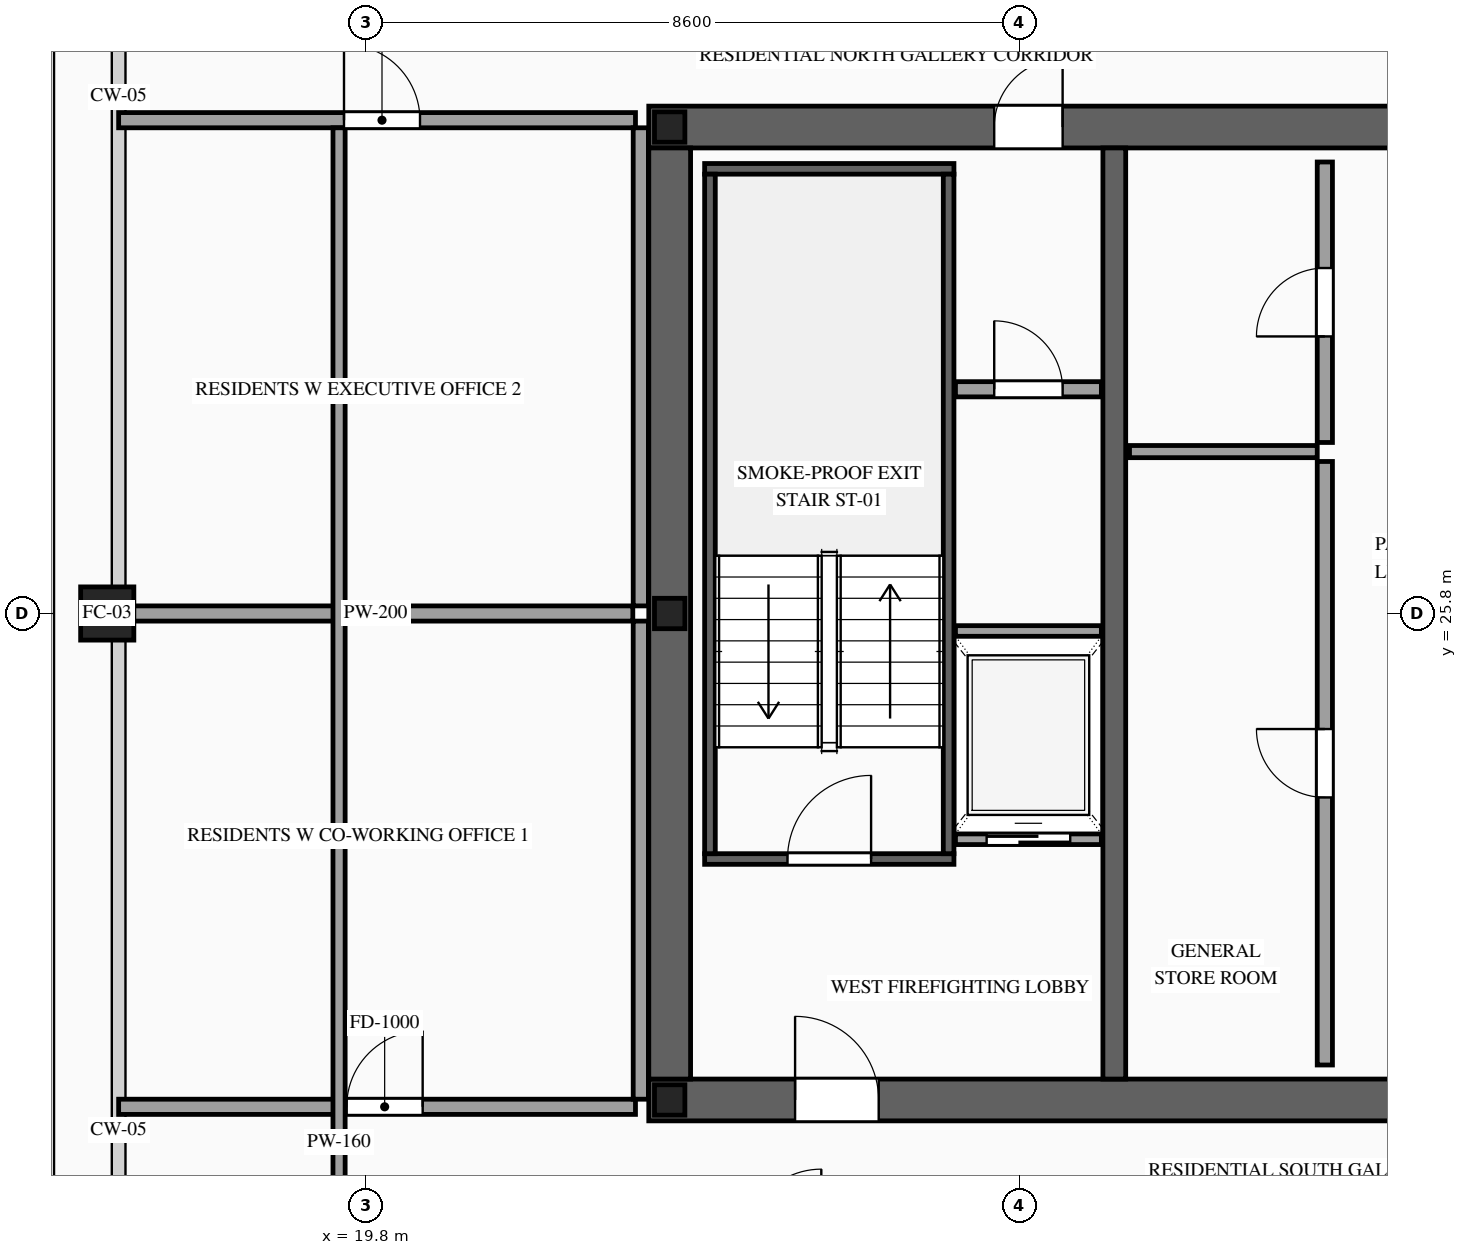
"""IFC4 building model, lengths in metres.
Left out: names, types, materials, properties, quantities, classifications, styles, units other than length and angle.
Written with IfcOpenShell. Run it as: python <this file> out.ifc"""

import sys

from ifc_helpers import new_model, si_unit, direction, frame, frame_2d, origin, origin_2d, place, context, subcontext, project, spatial, rectangle, hollow_rectangle, i_section, extrude, source, transform, mapped, element, fill, save


model = new_model("IFC4")
c1 = context("Model", 3, precision=1e-05, world=origin(), true_north=direction((0.0, 1.0)))
c2 = subcontext(c1, "Body", "Model", "MODEL_VIEW")
j1 = project(units=[si_unit("LENGTHUNIT", "METRE"), si_unit("PLANEANGLEUNIT", "RADIAN")], contexts=[c1])
p1 = place(None, origin())
s1 = spatial("IfcSite", under=j1, at=p1, CompositionType="ELEMENT")
p2 = place(p1, origin())
s2 = spatial("IfcBuilding", under=s1, at=p2, CompositionType="ELEMENT")
p3 = place(p2, frame((0.0, 0.0, 238.1)))
s3 = spatial("IfcBuildingStorey", under=s2, at=p3, CompositionType="ELEMENT", Elevation=238.1)
p4 = place(p3, frame((23.525, 19.4, 0.0), z_axis=(0.0, 0.0, 1.0), x_axis=(1.0, 0.0, 0.0)))
e1 = element("IfcWall", 1, at=p4, inside=s3, PredefinedType="SHEAR", context=c2, shape_type="SweptSolid", body=[
    extrude(rectangle(XDim=26.95, YDim=0.55, at=frame_2d((13.475, 0.0))), origin(), (0.0, 0.0, 1.0), 3.5),
])
p5 = place(p4, frame((1.925, 0.0, 0.0)))
e2 = element("IfcOpeningElement", 2, at=p5, cuts=e1, PredefinedType="OPENING", context=c2, shape_type="SweptSolid", body=[
    extrude(rectangle(XDim=1.1, YDim=2.2, at=frame_2d((0.55, 1.1))), frame((0.0, 0.29, 0.0), z_axis=(0.0, -1.0, 0.0), x_axis=(1.0, 0.0, 0.0)), (0.0, 0.0, 1.0), 0.58),
])
p6 = place(p4, frame((9.825, 0.0, 0.0)))
e3 = element("IfcOpeningElement", 3, at=p6, cuts=e1, PredefinedType="OPENING", context=c2, shape_type="SweptSolid", body=[
    extrude(rectangle(XDim=1.1, YDim=2.2, at=frame_2d((0.55, 1.1))), frame((0.0, 0.29, 0.0), z_axis=(0.0, -1.0, 0.0), x_axis=(1.0, 0.0, 0.0)), (0.0, 0.0, 1.0), 0.58),
])
p7 = place(p4, frame((23.025, 0.0, 0.0)))
e4 = element("IfcOpeningElement", 4, at=p7, cuts=e1, PredefinedType="OPENING", context=c2, shape_type="SweptSolid", body=[
    extrude(rectangle(XDim=1.1, YDim=2.2, at=frame_2d((0.55, 1.1))), frame((0.0, 0.29, 0.0), z_axis=(0.0, -1.0, 0.0), x_axis=(1.0, 0.0, 0.0)), (0.0, 0.0, 1.0), 0.58),
])
p8 = place(p4, frame((19.645, 0.0, 0.0)))
e5 = element("IfcOpeningElement", 5, at=p8, cuts=e1, PredefinedType="OPENING", context=c2, shape_type="SweptSolid", body=[
    extrude(rectangle(XDim=0.9, YDim=2.15, at=frame_2d((0.45, 1.075))), frame((0.0, 0.29, 0.0), z_axis=(0.0, -1.0, 0.0), x_axis=(1.0, 0.0, 0.0)), (0.0, 0.0, 1.0), 0.58),
])
p9 = place(p4, frame((18.205, 0.0, 0.0)))
e6 = element("IfcOpeningElement", 6, at=p9, cuts=e1, PredefinedType="OPENING", context=c2, shape_type="SweptSolid", body=[
    extrude(rectangle(XDim=0.9, YDim=2.15, at=frame_2d((0.45, 1.075))), frame((0.0, 0.29, 0.0), z_axis=(0.0, -1.0, 0.0), x_axis=(1.0, 0.0, 0.0)), (0.0, 0.0, 1.0), 0.58),
])
p10 = place(p3, frame((23.525, 32.2, 0.0), z_axis=(0.0, 0.0, 1.0), x_axis=(1.0, 0.0, 0.0)))
e7 = element("IfcWall", 7, at=p10, inside=s3, PredefinedType="SHEAR", context=c2, shape_type="SweptSolid", body=[
    extrude(rectangle(XDim=26.95, YDim=0.55, at=frame_2d((13.475, 0.0))), origin(), (0.0, 0.0, 1.0), 3.5),
])
p11 = place(p10, frame((4.545, 0.0, 0.0)))
e8 = element("IfcOpeningElement", 8, at=p11, cuts=e7, PredefinedType="OPENING", context=c2, shape_type="SweptSolid", body=[
    extrude(rectangle(XDim=0.9, YDim=2.15, at=frame_2d((0.45, 1.075))), frame((0.0, 0.29, 0.0), z_axis=(0.0, -1.0, 0.0), x_axis=(1.0, 0.0, 0.0)), (0.0, 0.0, 1.0), 0.58),
])
p12 = place(p10, frame((9.825, 0.0, 0.0)))
e9 = element("IfcOpeningElement", 9, at=p12, cuts=e7, PredefinedType="OPENING", context=c2, shape_type="SweptSolid", body=[
    extrude(rectangle(XDim=1.1, YDim=2.2, at=frame_2d((0.55, 1.1))), frame((0.0, 0.29, 0.0), z_axis=(0.0, -1.0, 0.0), x_axis=(1.0, 0.0, 0.0)), (0.0, 0.0, 1.0), 0.58),
])
p13 = place(p10, frame((15.675, 0.0, 0.0)))
e10 = element("IfcOpeningElement", 10, at=p13, cuts=e7, PredefinedType="OPENING", context=c2, shape_type="SweptSolid", body=[
    extrude(rectangle(XDim=1.1, YDim=2.2, at=frame_2d((0.55, 1.1))), frame((0.0, 0.29, 0.0), z_axis=(0.0, -1.0, 0.0), x_axis=(1.0, 0.0, 0.0)), (0.0, 0.0, 1.0), 0.58),
])
p14 = place(p10, frame((18.205, 0.0, 0.0)))
e11 = element("IfcOpeningElement", 11, at=p14, cuts=e7, PredefinedType="OPENING", context=c2, shape_type="SweptSolid", body=[
    extrude(rectangle(XDim=0.9, YDim=2.15, at=frame_2d((0.45, 1.075))), frame((0.0, 0.29, 0.0), z_axis=(0.0, -1.0, 0.0), x_axis=(1.0, 0.0, 0.0)), (0.0, 0.0, 1.0), 0.58),
])
p15 = place(p10, frame((19.645, 0.0, 0.0)))
e12 = element("IfcOpeningElement", 12, at=p15, cuts=e7, PredefinedType="OPENING", context=c2, shape_type="SweptSolid", body=[
    extrude(rectangle(XDim=0.9, YDim=2.15, at=frame_2d((0.45, 1.075))), frame((0.0, 0.29, 0.0), z_axis=(0.0, -1.0, 0.0), x_axis=(1.0, 0.0, 0.0)), (0.0, 0.0, 1.0), 0.58),
])
m1 = source(origin(), c2, "Body", "SweptSolid", [
    extrude(rectangle(XDim=12.25, YDim=0.55, at=frame_2d((6.125, 0.0))), origin(), (0.0, 0.0, 1.0), 3.5),
])
p16 = place(p3, frame((23.8, 19.675, 0.0), z_axis=(0.0, 0.0, 1.0), x_axis=(0.0, 1.0, 0.0)))
e13 = element("IfcWall", 13, at=p16, inside=s3, PredefinedType="SHEAR", context=c2, shape_type="MappedRepresentation", body=[
    mapped(m1, transform((0.0, 0.0, 0.0), scale=1.0)),
])
m2 = source(origin(), c2, "Body", "SweptSolid", [
    extrude(rectangle(XDim=12.25, YDim=0.3, at=frame_2d((6.125, 0.0))), origin(), (0.0, 0.0, 1.0), 3.5),
])
p17 = place(p3, frame((29.65, 19.675, 0.0), z_axis=(0.0, 0.0, 1.0), x_axis=(0.0, 1.0, 0.0)))
e14 = element("IfcWall", 14, at=p17, inside=s3, PredefinedType="SOLIDWALL", context=c2, shape_type="MappedRepresentation", body=[
    mapped(m2, transform((0.0, 0.0, 0.0), scale=1.0)),
])
m3 = source(origin(), c2, "Body", "SweptSolid", [
    extrude(i_section(OverallWidth=0.4, OverallDepth=0.4, WebThickness=0.013, FlangeThickness=0.021, at=origin_2d()), origin(), (0.0, 0.0, 1.0), 3.5),
])
for number, where, z_axis, x_axis in (
    (15, (23.8, 19.4, 0.0), (0.0, 0.0, 1.0), (1.0, 0.0, 0.0)),
    (16, (23.8, 25.8, 0.0), (0.0, 0.0, 1.0), (1.0, 0.0, 0.0)),
    (17, (23.8, 32.2, 0.0), (0.0, 0.0, 1.0), (1.0, 0.0, 0.0)),
):
    element("IfcColumn", number, at=place(p3, frame(where, z_axis=z_axis, x_axis=x_axis)), inside=s3, PredefinedType="COLUMN", context=c2, shape_type="MappedRepresentation", body=[
        mapped(m3, transform((0.0, 0.0, 0.0), scale=1.0)),
    ])
m4 = source(origin(), c2, "Body", "SweptSolid", [
    extrude(hollow_rectangle(XDim=0.7, YDim=0.7, WallThickness=0.032, at=origin_2d()), origin(), (0.0, 0.0, 1.0), 3.5),
])
p18 = place(p3, frame((16.4, 25.8, 0.0), z_axis=(0.0, 0.0, 1.0), x_axis=(1.0, 0.0, 0.0)))
e18 = element("IfcColumn", 18, at=p18, inside=s3, PredefinedType="COLUMN", context=c2, shape_type="MappedRepresentation", body=[
    mapped(m4, transform((0.0, 0.0, 0.0), scale=1.0)),
])
p19 = place(p3, frame((27.56, 22.83, 0.0), z_axis=(0.0, 0.0, 1.0), x_axis=(1.0, 0.0, 0.0)))
e19 = element("IfcWall", 19, at=p19, inside=s3, PredefinedType="SOLIDWALL", context=c2, shape_type="SweptSolid", body=[
    extrude(rectangle(XDim=1.92, YDim=0.14, at=frame_2d((0.96, 0.0))), origin(), (0.0, 0.0, 1.0), 3.28),
])
p20 = place(p19, frame((0.41, 0.0, 0.0)))
e20 = element("IfcOpeningElement", 20, at=p20, cuts=e19, PredefinedType="OPENING", context=c2, shape_type="SweptSolid", body=[
    extrude(rectangle(XDim=1.1, YDim=2.2, at=frame_2d((0.55, 1.1))), frame((0.0, 0.085, 0.0), z_axis=(0.0, -1.0, 0.0), x_axis=(1.0, 0.0, 0.0)), (0.0, 0.0, 1.0), 0.17),
])
m5 = source(origin(), c2, "Body", "SweptSolid", [
    extrude(rectangle(XDim=1.92, YDim=0.14, at=frame_2d((0.96, 0.0))), origin(), (0.0, 0.0, 1.0), 3.28),
])
p21 = place(p3, frame((27.56, 25.57, 0.0), z_axis=(0.0, 0.0, 1.0), x_axis=(1.0, 0.0, 0.0)))
e21 = element("IfcWall", 21, at=p21, inside=s3, PredefinedType="SOLIDWALL", context=c2, shape_type="MappedRepresentation", body=[
    mapped(m5, transform((0.0, 0.0, 0.0), scale=1.0)),
])
p22 = place(p3, frame((24.26, 22.57, 0.0), z_axis=(0.0, 0.0, 1.0), x_axis=(1.0, 0.0, 0.0)))
e22 = element("IfcWall", 22, at=p22, inside=s3, PredefinedType="SOLIDWALL", context=c2, shape_type="SweptSolid", body=[
    extrude(rectangle(XDim=3.28, YDim=0.14, at=frame_2d((1.64, 0.0))), origin(), (0.0, 0.0, 1.0), 3.28),
])
p23 = place(p22, frame((1.09, 0.0, 0.0)))
e23 = element("IfcOpeningElement", 23, at=p23, cuts=e22, PredefinedType="OPENING", context=c2, shape_type="SweptSolid", body=[
    extrude(rectangle(XDim=1.1, YDim=2.2, at=frame_2d((0.55, 1.1))), frame((0.0, 0.085, 0.0), z_axis=(0.0, -1.0, 0.0), x_axis=(1.0, 0.0, 0.0)), (0.0, 0.0, 1.0), 0.17),
])
m6 = source(origin(), c2, "Body", "SweptSolid", [
    extrude(rectangle(XDim=3.28, YDim=0.14, at=frame_2d((1.64, 0.0))), origin(), (0.0, 0.0, 1.0), 3.28),
])
p24 = place(p3, frame((24.26, 31.65, 0.0), z_axis=(0.0, 0.0, 1.0), x_axis=(1.0, 0.0, 0.0)))
e24 = element("IfcWall", 24, at=p24, inside=s3, PredefinedType="SOLIDWALL", context=c2, shape_type="MappedRepresentation", body=[
    mapped(m6, transform((0.0, 0.0, 0.0), scale=1.0)),
])
m7 = source(origin(), c2, "Body", "SweptSolid", [
    extrude(rectangle(XDim=8.94, YDim=0.14, at=frame_2d((4.47, 0.0))), origin(), (0.0, 0.0, 1.0), 3.28),
])
for number, where, z_axis, x_axis in (
    (25, (24.33, 22.64, 0.0), (0.0, 0.0, 1.0), (0.0, 1.0, 0.0)),
    (26, (27.47, 22.64, 0.0), (0.0, 0.0, 1.0), (0.0, 1.0, 0.0)),
):
    element("IfcWall", number, at=place(p3, frame(where, z_axis=z_axis, x_axis=x_axis)), inside=s3, PredefinedType="SOLIDWALL", context=c2, shape_type="MappedRepresentation", body=[
        mapped(m7, transform((0.0, 0.0, 0.0), scale=1.0)),
    ])
p25 = place(p3, frame((27.56, 28.75, 0.0), z_axis=(0.0, 0.0, 1.0), x_axis=(1.0, 0.0, 0.0)))
e27 = element("IfcWall", 27, at=p25, inside=s3, PredefinedType="PARTITIONING", context=c2, shape_type="SweptSolid", body=[
    extrude(rectangle(XDim=1.92, YDim=0.2, at=frame_2d((0.96, 0.0))), origin(), (0.0, 0.0, 1.0), 3.28),
])
p26 = place(p25, frame((0.51, 0.0, 0.0)))
e28 = element("IfcOpeningElement", 28, at=p26, cuts=e27, PredefinedType="OPENING", context=c2, shape_type="SweptSolid", body=[
    extrude(rectangle(XDim=0.9, YDim=2.15, at=frame_2d((0.45, 1.075))), frame((0.0, 0.115, 0.0), z_axis=(0.0, -1.0, 0.0), x_axis=(1.0, 0.0, 0.0)), (0.0, 0.0, 1.0), 0.23),
])
p27 = place(p3, frame((32.42, 19.86, 0.0), z_axis=(0.0, 0.0, 1.0), x_axis=(0.0, 1.0, 0.0)))
e29 = element("IfcWall", 29, at=p27, inside=s3, PredefinedType="PARTITIONING", context=c2, shape_type="SweptSolid", body=[
    extrude(rectangle(XDim=7.94, YDim=0.2, at=frame_2d((3.97, 0.0))), origin(), (0.0, 0.0, 1.0), 3.28),
])
p28 = place(p27, frame((3.52, 0.0, 0.0)))
e30 = element("IfcOpeningElement", 30, at=p28, cuts=e29, PredefinedType="OPENING", context=c2, shape_type="SweptSolid", body=[
    extrude(rectangle(XDim=0.9, YDim=2.15, at=frame_2d((0.45, 1.075))), frame((0.0, 0.115, 0.0), z_axis=(0.0, -1.0, 0.0), x_axis=(1.0, 0.0, 0.0)), (0.0, 0.0, 1.0), 0.23),
])
p29 = place(p3, frame((32.42, 28.05, 0.0), z_axis=(0.0, 0.0, 1.0), x_axis=(0.0, 1.0, 0.0)))
e31 = element("IfcWall", 31, at=p29, inside=s3, PredefinedType="PARTITIONING", context=c2, shape_type="SweptSolid", body=[
    extrude(rectangle(XDim=3.69, YDim=0.2, at=frame_2d((1.845, 0.0))), origin(), (0.0, 0.0, 1.0), 3.28),
])
p30 = place(p29, frame((1.395, 0.0, 0.0)))
e32 = element("IfcOpeningElement", 32, at=p30, cuts=e31, PredefinedType="OPENING", context=c2, shape_type="SweptSolid", body=[
    extrude(rectangle(XDim=0.9, YDim=2.15, at=frame_2d((0.45, 1.075))), frame((0.0, 0.115, 0.0), z_axis=(0.0, -1.0, 0.0), x_axis=(1.0, 0.0, 0.0)), (0.0, 0.0, 1.0), 0.23),
])
m8 = source(origin(), c2, "Body", "SweptSolid", [
    extrude(rectangle(XDim=2.47, YDim=0.16, at=frame_2d((1.235, 0.0))), origin(), (0.0, 0.0, 1.0), 3.28),
])
p31 = place(p3, frame((29.85, 27.93, 0.0), z_axis=(0.0, 0.0, 1.0), x_axis=(1.0, 0.0, 0.0)))
e33 = element("IfcWall", 33, at=p31, inside=s3, PredefinedType="PARTITIONING", context=c2, shape_type="MappedRepresentation", body=[
    mapped(m8, transform((0.0, 0.0, 0.0), scale=1.0)),
])
p32 = place(p3, frame((16.55, 19.31, 0.0), z_axis=(0.0, 0.0, 1.0), x_axis=(1.0, 0.0, 0.0)))
e34 = element("IfcWall", 34, at=p32, inside=s3, PredefinedType="PARTITIONING", context=c2, shape_type="SweptSolid", body=[
    extrude(rectangle(XDim=6.8, YDim=0.2, at=frame_2d((3.4, 0.0))), origin(), (0.0, 0.0, 1.0), 2.825),
])
p33 = place(p32, frame((3.0, 0.0, 0.0)))
e35 = element("IfcOpeningElement", 35, at=p33, cuts=e34, PredefinedType="OPENING", context=c2, shape_type="SweptSolid", body=[
    extrude(rectangle(XDim=1.0, YDim=2.2, at=frame_2d((0.5, 1.1))), frame((0.0, 0.115, 0.0), z_axis=(0.0, -1.0, 0.0), x_axis=(1.0, 0.0, 0.0)), (0.0, 0.0, 1.0), 0.23),
])
m9 = source(origin(), c2, "Body", "SweptSolid", [
    extrude(rectangle(XDim=6.765, YDim=0.2, at=frame_2d((3.382, 0.0))), origin(), (0.0, 0.0, 1.0), 2.787),
])
p34 = place(p3, frame((16.55, 25.8, 0.0), z_axis=(0.0, 0.0, 1.0), x_axis=(1.0, 0.0, 0.0)))
e36 = element("IfcWall", 36, at=p34, inside=s3, PredefinedType="PARTITIONING", context=c2, shape_type="MappedRepresentation", body=[
    mapped(m9, transform((0.0, 0.0, 0.0), scale=1.0)),
])
m10 = source(origin(), c2, "Body", "SweptSolid", [
    extrude(rectangle(XDim=6.29, YDim=0.2, at=frame_2d((3.145, 0.0))), origin(), (0.0, 0.0, 1.0), 3.28),
])
p35 = place(p3, frame((23.42, 19.41, 0.0), z_axis=(0.0, 0.0, 1.0), x_axis=(0.0, 1.0, 0.0)))
e37 = element("IfcWall", 37, at=p35, inside=s3, PredefinedType="PARTITIONING", context=c2, shape_type="MappedRepresentation", body=[
    mapped(m10, transform((0.0, 0.0, 0.0), scale=1.0)),
])
p36 = place(p3, frame((16.55, 32.29, 0.0), z_axis=(0.0, 0.0, 1.0), x_axis=(1.0, 0.0, 0.0)))
e38 = element("IfcWall", 38, at=p36, inside=s3, PredefinedType="PARTITIONING", context=c2, shape_type="SweptSolid", body=[
    extrude(rectangle(XDim=6.8, YDim=0.2, at=frame_2d((3.4, 0.0))), origin(), (0.0, 0.0, 1.0), 2.825),
])
p37 = place(p36, frame((2.965, 0.0, 0.0)))
e39 = element("IfcOpeningElement", 39, at=p37, cuts=e38, PredefinedType="OPENING", context=c2, shape_type="SweptSolid", body=[
    extrude(rectangle(XDim=1.0, YDim=2.2, at=frame_2d((0.5, 1.1))), frame((0.0, 0.115, 0.0), z_axis=(0.0, -1.0, 0.0), x_axis=(1.0, 0.0, 0.0)), (0.0, 0.0, 1.0), 0.23),
])
m11 = source(origin(), c2, "Body", "SweptSolid", [
    extrude(rectangle(XDim=26.69, YDim=0.16, at=frame_2d((13.345, 0.0))), origin(), (0.0, 0.0, 1.0), 3.28),
])
p38 = place(p3, frame((19.45, 5.5, 0.0), z_axis=(0.0, 0.0, 1.0), x_axis=(0.0, 1.0, 0.0)))
e40 = element("IfcWall", 40, at=p38, inside=s3, PredefinedType="PARTITIONING", context=c2, shape_type="MappedRepresentation", body=[
    mapped(m11, transform((0.0, 0.0, 0.0), scale=1.0)),
])
p39 = place(p3, frame((23.42, 25.9, 0.0), z_axis=(0.0, 0.0, 1.0), x_axis=(0.0, 1.0, 0.0)))
e41 = element("IfcWall", 41, at=p39, inside=s3, PredefinedType="PARTITIONING", context=c2, shape_type="MappedRepresentation", body=[
    mapped(m10, transform((0.0, 0.0, 0.0), scale=1.0)),
])
m12 = source(origin(), c2, "Body", "SweptSolid", [
    extrude(rectangle(XDim=1.1, YDim=2.2, at=frame_2d((0.55, 1.1))), frame((0.0, 0.025, 0.0), z_axis=(0.0, -1.0, 0.0), x_axis=(1.0, 0.0, 0.0)), (0.0, 0.0, 1.0), 0.05),
])
p40 = place(p20, origin())
e42 = element("IfcDoor", 42, at=p40, inside=s3, OperationType="SLIDING_TO_LEFT", PredefinedType="DOOR", context=c2, shape_type="MappedRepresentation", body=[
    mapped(m12, transform((0.0, 0.0, 0.0), scale=1.0)),
])
fill(e20, e42)
m13 = source(origin(), c2, "Body", "SweptSolid", [
    extrude(rectangle(XDim=1.1, YDim=2.2, at=frame_2d((0.55, 1.1))), frame((0.0, 0.025, 0.0), z_axis=(0.0, -1.0, 0.0), x_axis=(1.0, 0.0, 0.0)), (0.0, 0.0, 1.0), 0.05),
])
p41 = place(p23, origin())
e43 = element("IfcDoor", 43, at=p41, inside=s3, OperationType="SINGLE_SWING_RIGHT", PredefinedType="DOOR", context=c2, shape_type="MappedRepresentation", body=[
    mapped(m13, transform((0.0, 0.0, 0.0), scale=1.0)),
])
fill(e23, e43)
p42 = place(p5, origin())
e44 = element("IfcDoor", 44, at=p42, inside=s3, OperationType="SINGLE_SWING_LEFT", PredefinedType="DOOR", context=c2, shape_type="MappedRepresentation", body=[
    mapped(m13, transform((0.0, 0.0, 0.0), scale=1.0)),
])
fill(e2, e44)
m14 = source(origin(), c2, "Body", "SweptSolid", [
    extrude(rectangle(XDim=0.9, YDim=2.15, at=frame_2d((0.45, 1.075))), frame((0.0, 0.025, 0.0), z_axis=(0.0, -1.0, 0.0), x_axis=(1.0, 0.0, 0.0)), (0.0, 0.0, 1.0), 0.05),
])
p43 = place(p11, origin())
e45 = element("IfcDoor", 45, at=p43, inside=s3, OperationType="SINGLE_SWING_RIGHT", PredefinedType="DOOR", context=c2, shape_type="MappedRepresentation", body=[
    mapped(m14, transform((0.0, 0.0, 0.0), scale=1.0)),
])
fill(e8, e45)
p44 = place(p26, origin())
e46 = element("IfcDoor", 46, at=p44, inside=s3, OperationType="SINGLE_SWING_LEFT", PredefinedType="DOOR", context=c2, shape_type="MappedRepresentation", body=[
    mapped(m14, transform((0.0, 0.0, 0.0), scale=1.0)),
])
fill(e28, e46)
p45 = place(p28, origin())
e47 = element("IfcDoor", 47, at=p45, inside=s3, OperationType="SINGLE_SWING_RIGHT", PredefinedType="DOOR", context=c2, shape_type="MappedRepresentation", body=[
    mapped(m14, transform((0.0, 0.0, 0.0), scale=1.0)),
])
fill(e30, e47)
p46 = place(p30, origin())
e48 = element("IfcDoor", 48, at=p46, inside=s3, OperationType="SINGLE_SWING_LEFT", PredefinedType="DOOR", context=c2, shape_type="MappedRepresentation", body=[
    mapped(m14, transform((0.0, 0.0, 0.0), scale=1.0)),
])
fill(e32, e48)
m15 = source(origin(), c2, "Body", "SweptSolid", [
    extrude(rectangle(XDim=1.0, YDim=2.2, at=frame_2d((0.5, 1.1))), frame((0.0, 0.025, 0.0), z_axis=(0.0, -1.0, 0.0), x_axis=(1.0, 0.0, 0.0)), (0.0, 0.0, 1.0), 0.05),
])
p47 = place(p33, origin())
e49 = element("IfcDoor", 49, at=p47, inside=s3, OperationType="SINGLE_SWING_RIGHT", PredefinedType="DOOR", context=c2, shape_type="MappedRepresentation", body=[
    mapped(m15, transform((0.0, 0.0, 0.0), scale=1.0)),
])
fill(e35, e49)
p48 = place(p37, origin())
e50 = element("IfcDoor", 50, at=p48, inside=s3, OperationType="SINGLE_SWING_LEFT", PredefinedType="DOOR", context=c2, shape_type="MappedRepresentation", body=[
    mapped(m15, transform((0.0, 0.0, 0.0), scale=1.0)),
])
fill(e39, e50)
save(model, sys.argv[1])
